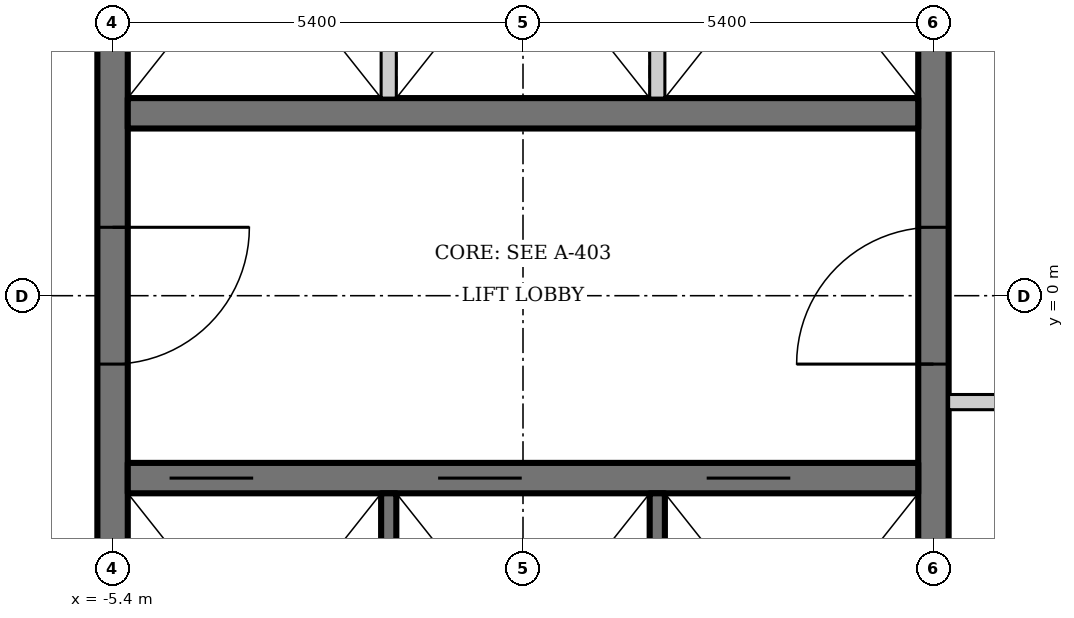
"""IFC4 building model, lengths in metres.
Left out: names, types, materials, properties, quantities, classifications, styles, units other than length and angle.
Written with IfcOpenShell. Run it as: python <this file> out.ifc"""

import sys

from ifc_helpers import new_model, si_unit, direction, frame, frame_2d, origin, place, context, subcontext, project, spatial, rectangle, extrude, element, fill, save


model = new_model("IFC4")
c1 = context("Model", 3, precision=1e-05, world=origin(), true_north=direction((0.0, 1.0)))
c2 = subcontext(c1, "Body", "Model", "MODEL_VIEW")
j1 = project(units=[si_unit("LENGTHUNIT", "METRE"), si_unit("PLANEANGLEUNIT", "RADIAN")], contexts=[c1])
p1 = place(None, origin())
s1 = spatial("IfcSite", under=j1, at=p1, CompositionType="ELEMENT")
p2 = place(p1, origin())
s2 = spatial("IfcBuilding", under=s1, at=p2, CompositionType="ELEMENT")
p3 = place(p2, frame((0.0, 0.0, 37.0)))
s3 = spatial("IfcBuildingStorey", under=s2, at=p3, CompositionType="ELEMENT", Elevation=37.0)
p4 = place(p3, frame((5.4, -6.8, 0.0), z_axis=(0.0, 0.0, 1.0), x_axis=(0.0, 1.0, 0.0)))
e1 = element("IfcWall", 1, at=p4, inside=s3, PredefinedType="SHEAR", context=c2, shape_type="SweptSolid", body=[
    extrude(rectangle(XDim=13.6, YDim=0.4, at=frame_2d((6.8, 0.0))), origin(), (0.0, 0.0, 1.0), 3.6),
])
p5 = place(p4, frame((5.9, 0.0, 0.0)))
e2 = element("IfcOpeningElement", 2, at=p5, cuts=e1, PredefinedType="OPENING", context=c2, shape_type="SweptSolid", body=[
    extrude(rectangle(XDim=1.8, YDim=2.1, at=frame_2d((0.9, 1.05))), frame((0.0, 0.21, 0.0), z_axis=(0.0, -1.0, 0.0), x_axis=(1.0, 0.0, 0.0)), (0.0, 0.0, 1.0), 0.42),
])
p6 = place(p3, frame((-5.4, 6.8, 0.0), z_axis=(0.0, 0.0, 1.0), x_axis=(0.0, -1.0, 0.0)))
e3 = element("IfcWall", 3, at=p6, inside=s3, PredefinedType="SHEAR", context=c2, shape_type="SweptSolid", body=[
    extrude(rectangle(XDim=13.6, YDim=0.4, at=frame_2d((6.8, 0.0))), origin(), (0.0, 0.0, 1.0), 3.6),
])
p7 = place(p6, frame((5.9, 0.0, 0.0)))
e4 = element("IfcOpeningElement", 4, at=p7, cuts=e3, PredefinedType="OPENING", context=c2, shape_type="SweptSolid", body=[
    extrude(rectangle(XDim=1.8, YDim=2.1, at=frame_2d((0.9, 1.05))), frame((0.0, 0.21, 0.0), z_axis=(0.0, -1.0, 0.0), x_axis=(1.0, 0.0, 0.0)), (0.0, 0.0, 1.0), 0.42),
])
p8 = place(p3, frame((-5.2, -2.4, 0.0), z_axis=(0.0, 0.0, 1.0), x_axis=(1.0, 0.0, 0.0)))
e5 = element("IfcWall", 5, at=p8, inside=s3, PredefinedType="SHEAR", context=c2, shape_type="SweptSolid", body=[
    extrude(rectangle(XDim=10.4, YDim=0.4, at=frame_2d((5.2, 0.0))), origin(), (0.0, 0.0, 1.0), 3.6),
])
p9 = place(p8, frame((0.55, 0.0, 0.0)))
e6 = element("IfcOpeningElement", 6, at=p9, cuts=e5, PredefinedType="OPENING", context=c2, shape_type="SweptSolid", body=[
    extrude(rectangle(XDim=1.1, YDim=2.2, at=frame_2d((0.55, 1.1))), frame((0.0, 0.21, 0.0), z_axis=(0.0, -1.0, 0.0), x_axis=(1.0, 0.0, 0.0)), (0.0, 0.0, 1.0), 0.42),
])
p10 = place(p8, frame((4.083, 0.0, 0.0)))
e7 = element("IfcOpeningElement", 7, at=p10, cuts=e5, PredefinedType="OPENING", context=c2, shape_type="SweptSolid", body=[
    extrude(rectangle(XDim=1.1, YDim=2.2, at=frame_2d((0.55, 1.1))), frame((0.0, 0.21, 0.0), z_axis=(0.0, -1.0, 0.0), x_axis=(1.0, 0.0, 0.0)), (0.0, 0.0, 1.0), 0.42),
])
p11 = place(p8, frame((7.617, 0.0, 0.0)))
e8 = element("IfcOpeningElement", 8, at=p11, cuts=e5, PredefinedType="OPENING", context=c2, shape_type="SweptSolid", body=[
    extrude(rectangle(XDim=1.1, YDim=2.2, at=frame_2d((0.55, 1.1))), frame((0.0, 0.21, 0.0), z_axis=(0.0, -1.0, 0.0), x_axis=(1.0, 0.0, 0.0)), (0.0, 0.0, 1.0), 0.42),
])
for number, where, z_axis, x_axis in (
    (9, (-1.767, -2.6, 0.0), (0.0, 0.0, 1.0), (0.0, -1.0, 0.0)),
    (10, (1.767, -2.6, 0.0), (0.0, 0.0, 1.0), (0.0, -1.0, 0.0)),
):
    element("IfcWall", number, at=place(p3, frame(where, z_axis=z_axis, x_axis=x_axis)), inside=s3, PredefinedType="SOLIDWALL", context=c2, shape_type="SweptSolid", body=[
        extrude(rectangle(XDim=4.2, YDim=0.2, at=frame_2d((2.1, 0.0))), origin(), (0.0, 0.0, 1.0), 3.6),
    ])
p12 = place(p3, frame((5.2, 2.4, 0.0), z_axis=(0.0, 0.0, 1.0), x_axis=(-1.0, 0.0, 0.0)))
e11 = element("IfcWall", 11, at=p12, inside=s3, PredefinedType="SHEAR", context=c2, shape_type="SweptSolid", body=[
    extrude(rectangle(XDim=10.4, YDim=0.4, at=frame_2d((5.2, 0.0))), origin(), (0.0, 0.0, 1.0), 3.6),
])
for number, where, z_axis, x_axis in (
    (12, (-1.767, 2.6, 0.0), (0.0, 0.0, 1.0), (0.0, 1.0, 0.0)),
    (13, (1.767, 2.6, 0.0), (0.0, 0.0, 1.0), (0.0, 1.0, 0.0)),
):
    element("IfcWall", number, at=place(p3, frame(where, z_axis=z_axis, x_axis=x_axis)), inside=s3, PredefinedType="SOLIDWALL", context=c2, shape_type="SweptSolid", body=[
        extrude(rectangle(XDim=4.2, YDim=0.2, at=frame_2d((2.1, 0.0))), origin(), (0.0, 0.0, 1.0), 3.6),
    ])
p13 = place(p3, frame((5.6, -1.4, 0.0), z_axis=(0.0, 0.0, 1.0), x_axis=(1.0, 0.0, 0.0)))
e14 = element("IfcWall", 14, at=p13, inside=s3, PredefinedType="SOLIDWALL", context=c2, shape_type="SweptSolid", body=[
    extrude(rectangle(XDim=3.0, YDim=0.2, at=frame_2d((1.5, 0.0))), origin(), (0.0, 0.0, 1.0), 3.45),
])
p14 = place(p13, frame((1.05, 0.0, 0.0)))
e15 = element("IfcOpeningElement", 15, at=p14, cuts=e14, PredefinedType="OPENING", context=c2, shape_type="SweptSolid", body=[
    extrude(rectangle(XDim=0.9, YDim=2.1, at=frame_2d((0.45, 1.05))), frame((0.0, 0.11, 0.0), z_axis=(0.0, -1.0, 0.0), x_axis=(1.0, 0.0, 0.0)), (0.0, 0.0, 1.0), 0.22),
])
p15 = place(p5, origin())
e16 = element("IfcDoor", 16, at=p15, inside=s3, OperationType="DOUBLE_DOOR_DOUBLE_SWING", PredefinedType="DOOR", context=c2, shape_type="SweptSolid", body=[
    extrude(rectangle(XDim=1.8, YDim=2.1, at=frame_2d((0.9, 1.05))), frame((0.0, 0.025, 0.0), z_axis=(0.0, -1.0, 0.0), x_axis=(1.0, 0.0, 0.0)), (0.0, 0.0, 1.0), 0.05),
])
fill(e2, e16)
p16 = place(p7, origin())
e17 = element("IfcDoor", 17, at=p16, inside=s3, OperationType="DOUBLE_DOOR_DOUBLE_SWING", PredefinedType="DOOR", context=c2, shape_type="SweptSolid", body=[
    extrude(rectangle(XDim=1.8, YDim=2.1, at=frame_2d((0.9, 1.05))), frame((0.0, 0.025, 0.0), z_axis=(0.0, -1.0, 0.0), x_axis=(1.0, 0.0, 0.0)), (0.0, 0.0, 1.0), 0.05),
])
fill(e4, e17)
p17 = place(p9, origin())
e18 = element("IfcDoor", 18, at=p17, inside=s3, OperationType="DOUBLE_DOOR_SLIDING", PredefinedType="DOOR", context=c2, shape_type="SweptSolid", body=[
    extrude(rectangle(XDim=1.1, YDim=2.2, at=frame_2d((0.55, 1.1))), frame((0.0, 0.025, 0.0), z_axis=(0.0, -1.0, 0.0), x_axis=(1.0, 0.0, 0.0)), (0.0, 0.0, 1.0), 0.05),
])
fill(e6, e18)
p18 = place(p10, origin())
e19 = element("IfcDoor", 19, at=p18, inside=s3, OperationType="DOUBLE_DOOR_SLIDING", PredefinedType="DOOR", context=c2, shape_type="SweptSolid", body=[
    extrude(rectangle(XDim=1.1, YDim=2.2, at=frame_2d((0.55, 1.1))), frame((0.0, 0.025, 0.0), z_axis=(0.0, -1.0, 0.0), x_axis=(1.0, 0.0, 0.0)), (0.0, 0.0, 1.0), 0.05),
])
fill(e7, e19)
p19 = place(p11, origin())
e20 = element("IfcDoor", 20, at=p19, inside=s3, OperationType="DOUBLE_DOOR_SLIDING", PredefinedType="DOOR", context=c2, shape_type="SweptSolid", body=[
    extrude(rectangle(XDim=1.1, YDim=2.2, at=frame_2d((0.55, 1.1))), frame((0.0, 0.025, 0.0), z_axis=(0.0, -1.0, 0.0), x_axis=(1.0, 0.0, 0.0)), (0.0, 0.0, 1.0), 0.05),
])
fill(e8, e20)
save(model, sys.argv[1])
